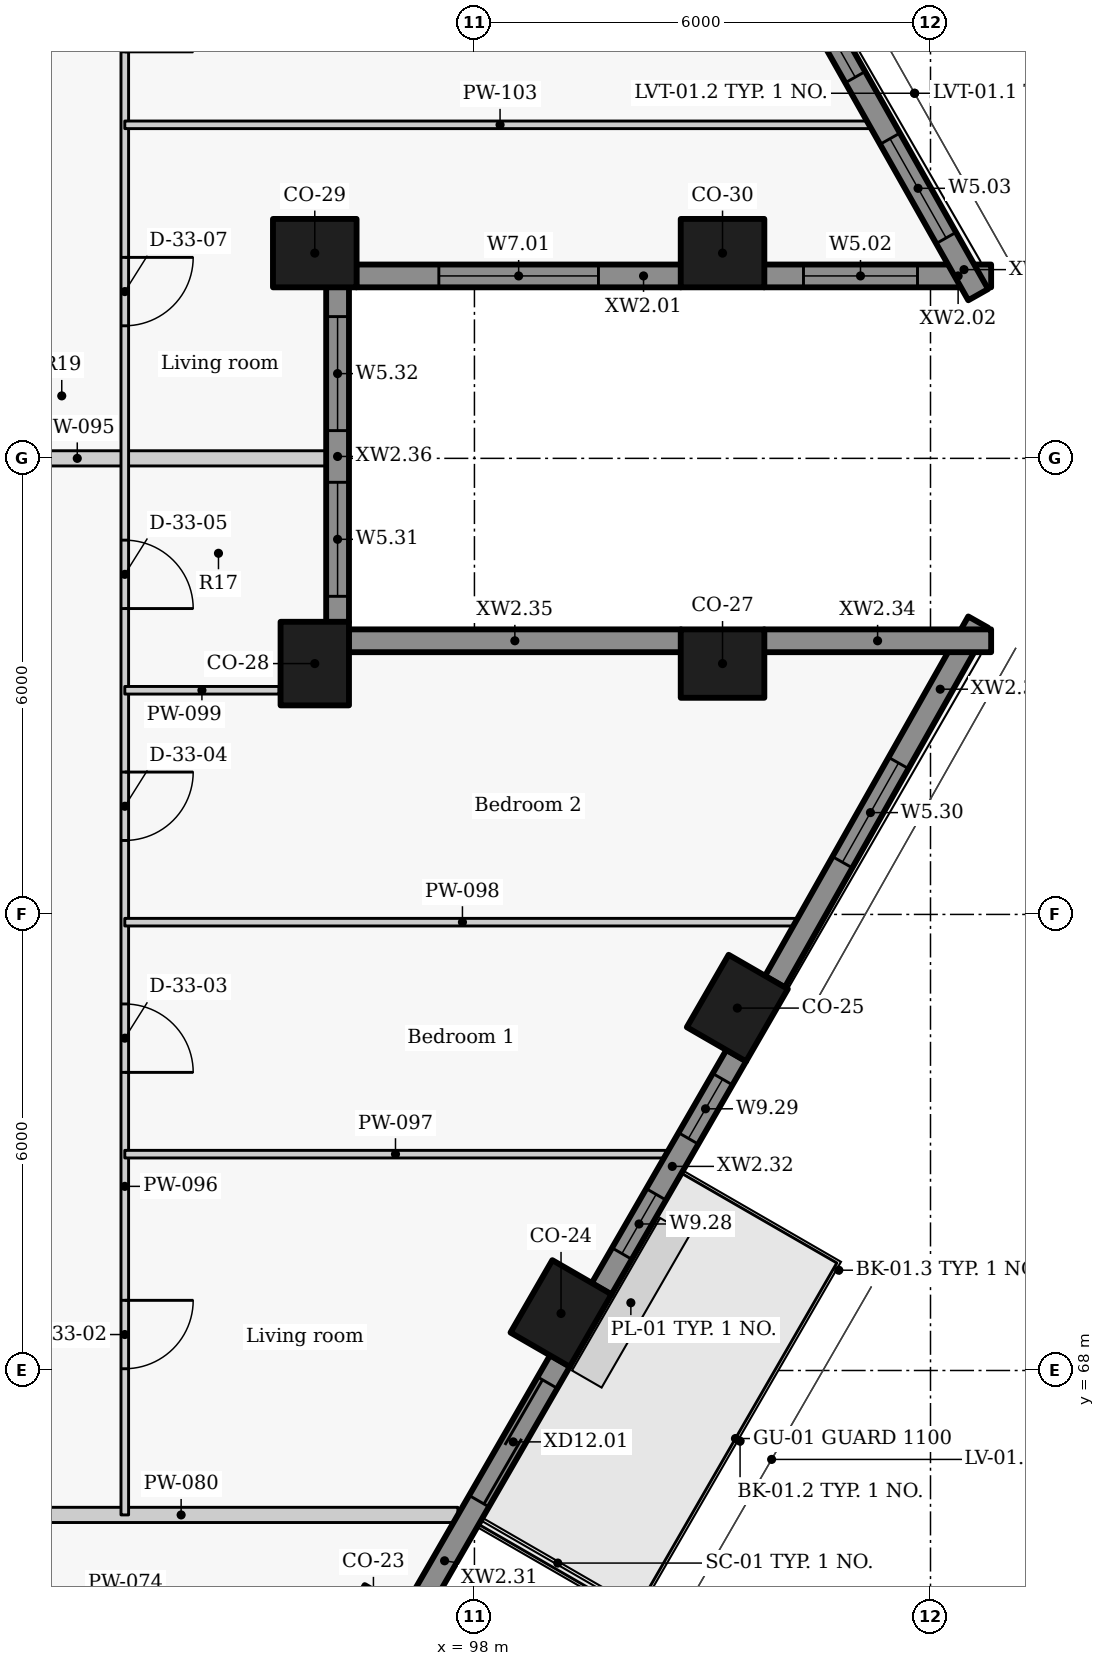
"""IFC4 building model, lengths in metres.
Left out: names, types, materials, properties, quantities, classifications, styles, units other than length and angle.
Written with IfcOpenShell. Run it as: python <this file> out.ifc"""

import sys

from ifc_helpers import new_model, si_unit, direction, frame, frame_2d, origin, origin_2d, place, context, subcontext, project, spatial, rectangle, extrude, element, fill, save


model = new_model("IFC4")
c1 = context("Model", 3, precision=1e-05, world=origin(), true_north=direction((0.0, 1.0)))
c2 = subcontext(c1, "Body", "Model", "MODEL_VIEW")
j1 = project(units=[si_unit("LENGTHUNIT", "METRE"), si_unit("PLANEANGLEUNIT", "RADIAN")], contexts=[c1])
p1 = place(None, origin())
s1 = spatial("IfcSite", under=j1, at=p1, CompositionType="ELEMENT")
p2 = place(p1, origin())
s2 = spatial("IfcBuilding", under=s1, at=p2, CompositionType="ELEMENT")
p3 = place(p2, frame((0.0, 0.0, 229.5)))
s3 = spatial("IfcBuildingStorey", under=s2, at=p3, CompositionType="ELEMENT", Elevation=229.5)
for number, where, z_axis, x_axis in (
    (1, (96.671, 64.475, 0.0), (0.0, 0.0, 1.0), (0.5, 0.866, 0.0)),
    (2, (99.139, 68.75, 0.0), (0.0, 0.0, 1.0), (0.5, 0.866, 0.0)),
    (3, (101.459, 72.768, 0.0), (0.0, 0.0, 1.0), (0.5, 0.866, 0.0)),
    (4, (101.264, 77.3, 0.0), (0.0, 0.0, 1.0), (-1.0, 0.0, 0.0)),
    (5, (95.899, 77.3, 0.0), (0.0, 0.0, 1.0), (0.0, 1.0, 0.0)),
    (6, (95.899, 82.7, 0.0), (0.0, 0.0, 1.0), (1.0, 0.0, 0.0)),
    (7, (101.264, 82.7, 0.0), (0.0, 0.0, 1.0), (1.0, 0.0, 0.0)),
):
    element("IfcColumn", number, at=place(p3, frame(where, z_axis=z_axis, x_axis=x_axis)), inside=s3, PredefinedType="COLUMN", context=c2, shape_type="SweptSolid", body=[
        extrude(rectangle(XDim=1.1, YDim=0.9, at=origin_2d()), origin(), (0.0, 0.0, 1.0), 3.3),
    ])
p4 = place(p3, frame((96.446, 82.4, 0.0), z_axis=(0.0, 0.0, 1.0), x_axis=(1.0, 0.0, 0.0)))
e8 = element("IfcWall", 8, at=p4, inside=s3, PredefinedType="SOLIDWALL", context=c2, shape_type="SweptSolid", body=[
    extrude(rectangle(XDim=4.272, YDim=0.3, at=frame_2d((2.136, 0.0))), origin(), (0.0, 0.0, 1.0), 2.425),
])
p5 = place(p4, frame((1.086, 0.0, 0.9)))
e9 = element("IfcOpeningElement", 9, at=p5, cuts=e8, PredefinedType="OPENING", context=c2, shape_type="SweptSolid", body=[
    extrude(rectangle(XDim=2.1, YDim=1.1, at=frame_2d((1.05, 0.55))), frame((0.0, 0.16, 0.0), z_axis=(0.0, -1.0, 0.0), x_axis=(1.0, 0.0, 0.0)), (0.0, 0.0, 1.0), 0.32),
])
p6 = place(p3, frame((101.81, 82.4, 0.0), z_axis=(0.0, 0.0, 1.0), x_axis=(1.0, 0.0, 0.0)))
e10 = element("IfcWall", 10, at=p6, inside=s3, PredefinedType="SOLIDWALL", context=c2, shape_type="SweptSolid", body=[
    extrude(rectangle(XDim=2.988, YDim=0.3, at=frame_2d((1.494, 0.0))), origin(), (0.0, 0.0, 1.0), 2.425),
])
p7 = place(p6, frame((0.519, 0.0, 0.9)))
e11 = element("IfcOpeningElement", 11, at=p7, cuts=e10, PredefinedType="OPENING", context=c2, shape_type="SweptSolid", body=[
    extrude(rectangle(XDim=1.5, YDim=1.1, at=frame_2d((0.75, 0.55))), frame((0.0, 0.16, 0.0), z_axis=(0.0, -1.0, 0.0), x_axis=(1.0, 0.0, 0.0)), (0.0, 0.0, 1.0), 0.32),
])
p8 = place(p3, frame((104.627, 82.154, 0.0), z_axis=(0.0, 0.0, 1.0), x_axis=(-0.492080931903, 0.870549456641, 0.0)))
e12 = element("IfcWall", 12, at=p8, inside=s3, PredefinedType="SOLIDWALL", context=c2, shape_type="SweptSolid", body=[
    extrude(rectangle(XDim=5.437, YDim=0.3, at=frame_2d((2.718, 0.0))), origin(), (0.0, 0.0, 1.0), 2.425),
])
p9 = place(p8, frame((0.857, 0.0, 0.9)))
e13 = element("IfcOpeningElement", 13, at=p9, cuts=e12, PredefinedType="OPENING", context=c2, shape_type="SweptSolid", body=[
    extrude(rectangle(XDim=1.5, YDim=1.1, at=frame_2d((0.75, 0.55))), frame((0.0, 0.16, 0.0), z_axis=(0.0, -1.0, 0.0), x_axis=(1.0, 0.0, 0.0)), (0.0, 0.0, 1.0), 0.32),
])
p10 = place(p8, frame((3.287, 0.0, 0.9)))
e14 = element("IfcOpeningElement", 14, at=p10, cuts=e12, PredefinedType="OPENING", context=c2, shape_type="SweptSolid", body=[
    extrude(rectangle(XDim=1.5, YDim=1.1, at=frame_2d((0.75, 0.55))), frame((0.0, 0.16, 0.0), z_axis=(0.0, -1.0, 0.0), x_axis=(1.0, 0.0, 0.0)), (0.0, 0.0, 1.0), 0.32),
])
p11 = place(p3, frame((97.204, 64.798, 0.0), z_axis=(0.0, 0.0, 1.0), x_axis=(0.499984490703, 0.866034357896, 0.0)))
e15 = element("IfcWall", 15, at=p11, inside=s3, PredefinedType="SOLIDWALL", context=c2, shape_type="SweptSolid", body=[
    extrude(rectangle(XDim=3.844, YDim=0.3, at=frame_2d((1.922, 0.0))), origin(), (0.0, 0.0, 1.0), 2.425),
])
p12 = place(p11, frame((1.713, 0.0, 0.0)))
e16 = element("IfcOpeningElement", 16, at=p12, cuts=e15, PredefinedType="OPENING", context=c2, shape_type="SweptSolid", body=[
    extrude(rectangle(XDim=1.8, YDim=2.0, at=frame_2d((0.9, 1.0))), frame((0.0, 0.16, 0.0), z_axis=(0.0, -1.0, 0.0), x_axis=(1.0, 0.0, 0.0)), (0.0, 0.0, 1.0), 0.32),
])
p13 = place(p3, frame((99.672, 69.073, 0.0), z_axis=(0.0, 0.0, 1.0), x_axis=(0.500010404316, 0.866019396766, 0.0)))
e17 = element("IfcWall", 17, at=p13, inside=s3, PredefinedType="SOLIDWALL", context=c2, shape_type="SweptSolid", body=[
    extrude(rectangle(XDim=3.547, YDim=0.3, at=frame_2d((1.774, 0.0))), origin(), (0.0, 0.0, 1.0), 2.425),
])
p14 = place(p13, frame((0.537, 0.0, 0.9)))
e18 = element("IfcOpeningElement", 18, at=p14, cuts=e17, PredefinedType="OPENING", context=c2, shape_type="SweptSolid", body=[
    extrude(rectangle(XDim=0.9, YDim=1.1, at=frame_2d((0.45, 0.55))), frame((0.0, 0.16, 0.0), z_axis=(0.0, -1.0, 0.0), x_axis=(1.0, 0.0, 0.0)), (0.0, 0.0, 1.0), 0.32),
])
p15 = place(p13, frame((2.286, 0.0, 0.9)))
e19 = element("IfcOpeningElement", 19, at=p15, cuts=e17, PredefinedType="OPENING", context=c2, shape_type="SweptSolid", body=[
    extrude(rectangle(XDim=0.9, YDim=1.1, at=frame_2d((0.45, 0.55))), frame((0.0, 0.16, 0.0), z_axis=(0.0, -1.0, 0.0), x_axis=(1.0, 0.0, 0.0)), (0.0, 0.0, 1.0), 0.32),
])
p16 = place(p3, frame((101.952, 73.114, 0.0), z_axis=(0.0, 0.0, 1.0), x_axis=(0.492080931903, 0.870549456641, 0.0)))
e20 = element("IfcWall", 20, at=p16, inside=s3, PredefinedType="SOLIDWALL", context=c2, shape_type="SweptSolid", body=[
    extrude(rectangle(XDim=5.437, YDim=0.3, at=frame_2d((2.718, 0.0))), origin(), (0.0, 0.0, 1.0), 2.425),
])
p17 = place(p16, frame((1.807, 0.0, 0.9)))
e21 = element("IfcOpeningElement", 21, at=p17, cuts=e20, PredefinedType="OPENING", context=c2, shape_type="SweptSolid", body=[
    extrude(rectangle(XDim=1.5, YDim=1.1, at=frame_2d((0.75, 0.55))), frame((0.0, 0.16, 0.0), z_axis=(0.0, -1.0, 0.0), x_axis=(1.0, 0.0, 0.0)), (0.0, 0.0, 1.0), 0.32),
])
p18 = place(p3, frame((104.798, 77.6, 0.0), z_axis=(0.0, 0.0, 1.0), x_axis=(-1.0, 0.0, 0.0)))
e22 = element("IfcWall", 22, at=p18, inside=s3, PredefinedType="SOLIDWALL", context=c2, shape_type="SweptSolid", body=[
    extrude(rectangle(XDim=2.988, YDim=0.3, at=frame_2d((1.494, 0.0))), origin(), (0.0, 0.0, 1.0), 2.425),
])
p19 = place(p3, frame((100.718, 77.6, 0.0), z_axis=(0.0, 0.0, 1.0), x_axis=(-1.0, 0.0, 0.0)))
e23 = element("IfcWall", 23, at=p19, inside=s3, PredefinedType="SOLIDWALL", context=c2, shape_type="SweptSolid", body=[
    extrude(rectangle(XDim=4.373, YDim=0.3, at=frame_2d((2.186, 0.0))), origin(), (0.0, 0.0, 1.0), 2.425),
])
p20 = place(p3, frame((96.199, 77.846, 0.0), z_axis=(0.0, 0.0, 1.0), x_axis=(0.0, 1.0, 0.0)))
e24 = element("IfcWall", 24, at=p20, inside=s3, PredefinedType="SOLIDWALL", context=c2, shape_type="SweptSolid", body=[
    extrude(rectangle(XDim=4.408, YDim=0.3, at=frame_2d((2.204, 0.0))), origin(), (0.0, 0.0, 1.0), 2.425),
])
p21 = place(p20, frame((0.339, 0.0, 0.9)))
e25 = element("IfcOpeningElement", 25, at=p21, cuts=e24, PredefinedType="OPENING", context=c2, shape_type="SweptSolid", body=[
    extrude(rectangle(XDim=1.5, YDim=1.1, at=frame_2d((0.75, 0.55))), frame((0.0, 0.16, 0.0), z_axis=(0.0, -1.0, 0.0), x_axis=(1.0, 0.0, 0.0)), (0.0, 0.0, 1.0), 0.32),
])
p22 = place(p20, frame((2.519, 0.0, 0.9)))
e26 = element("IfcOpeningElement", 26, at=p22, cuts=e24, PredefinedType="OPENING", context=c2, shape_type="SweptSolid", body=[
    extrude(rectangle(XDim=1.5, YDim=1.1, at=frame_2d((0.75, 0.55))), frame((0.0, 0.16, 0.0), z_axis=(0.0, -1.0, 0.0), x_axis=(1.0, 0.0, 0.0)), (0.0, 0.0, 1.0), 0.32),
])
p23 = place(p3, frame((90.5, 66.1, 0.0), z_axis=(0.0, 0.0, 1.0), x_axis=(1.0, 0.0, 0.0)))
e27 = element("IfcWall", 27, at=p23, inside=s3, PredefinedType="PARTITIONING", context=c2, shape_type="SweptSolid", body=[
    extrude(rectangle(XDim=7.282, YDim=0.2, at=frame_2d((3.641, 0.0))), origin(), (0.0, 0.0, 1.0), 2.405),
])
p24 = place(p3, frame((89.5, 80.0, 0.0), z_axis=(0.0, 0.0, 1.0), x_axis=(1.0, 0.0, 0.0)))
e28 = element("IfcWall", 28, at=p24, inside=s3, PredefinedType="PARTITIONING", context=c2, shape_type="SweptSolid", body=[
    extrude(rectangle(XDim=6.55, YDim=0.2, at=frame_2d((3.275, 0.0))), origin(), (0.0, 0.0, 1.0), 2.405),
])
p25 = place(p3, frame((93.4, 92.85, 0.0), z_axis=(0.0, 0.0, 1.0), x_axis=(0.0, -1.0, 0.0)))
e29 = element("IfcWall", 29, at=p25, inside=s3, PredefinedType="PARTITIONING", context=c2, shape_type="SweptSolid", body=[
    extrude(rectangle(XDim=26.75, YDim=0.1, at=frame_2d((13.375, 0.0))), origin(), (0.0, 0.0, 1.0), 3.025),
])
p26 = place(p25, frame((23.927, 0.0, 0.0)))
e30 = element("IfcOpeningElement", 30, at=p26, cuts=e29, PredefinedType="OPENING", context=c2, shape_type="SweptSolid", body=[
    extrude(rectangle(XDim=0.9, YDim=2.1, at=frame_2d((0.45, 1.05))), frame((0.0, 0.06, 0.0), z_axis=(0.0, -1.0, 0.0), x_axis=(1.0, 0.0, 0.0)), (0.0, 0.0, 1.0), 0.12),
])
p27 = place(p25, frame((20.028, 0.0, 0.0)))
e31 = element("IfcOpeningElement", 31, at=p27, cuts=e29, PredefinedType="OPENING", context=c2, shape_type="SweptSolid", body=[
    extrude(rectangle(XDim=0.9, YDim=2.1, at=frame_2d((0.45, 1.05))), frame((0.0, 0.06, 0.0), z_axis=(0.0, -1.0, 0.0), x_axis=(1.0, 0.0, 0.0)), (0.0, 0.0, 1.0), 0.12),
])
p28 = place(p25, frame((16.977, 0.0, 0.0)))
e32 = element("IfcOpeningElement", 32, at=p28, cuts=e29, PredefinedType="OPENING", context=c2, shape_type="SweptSolid", body=[
    extrude(rectangle(XDim=0.9, YDim=2.1, at=frame_2d((0.45, 1.05))), frame((0.0, 0.06, 0.0), z_axis=(0.0, -1.0, 0.0), x_axis=(1.0, 0.0, 0.0)), (0.0, 0.0, 1.0), 0.12),
])
p29 = place(p25, frame((13.926, 0.0, 0.0)))
e33 = element("IfcOpeningElement", 33, at=p29, cuts=e29, PredefinedType="OPENING", context=c2, shape_type="SweptSolid", body=[
    extrude(rectangle(XDim=0.9, YDim=2.1, at=frame_2d((0.45, 1.05))), frame((0.0, 0.06, 0.0), z_axis=(0.0, -1.0, 0.0), x_axis=(1.0, 0.0, 0.0)), (0.0, 0.0, 1.0), 0.12),
])
p30 = place(p25, frame((10.206, 0.0, 0.0)))
e34 = element("IfcOpeningElement", 34, at=p30, cuts=e29, PredefinedType="OPENING", context=c2, shape_type="SweptSolid", body=[
    extrude(rectangle(XDim=0.9, YDim=2.1, at=frame_2d((0.45, 1.05))), frame((0.0, 0.06, 0.0), z_axis=(0.0, -1.0, 0.0), x_axis=(1.0, 0.0, 0.0)), (0.0, 0.0, 1.0), 0.12),
])
p31 = place(p25, frame((6.602, 0.0, 0.0)))
e35 = element("IfcOpeningElement", 35, at=p31, cuts=e29, PredefinedType="OPENING", context=c2, shape_type="SweptSolid", body=[
    extrude(rectangle(XDim=0.9, YDim=2.1, at=frame_2d((0.45, 1.05))), frame((0.0, 0.06, 0.0), z_axis=(0.0, -1.0, 0.0), x_axis=(1.0, 0.0, 0.0)), (0.0, 0.0, 1.0), 0.12),
])
p32 = place(p25, frame((3.781, 0.0, 0.0)))
e36 = element("IfcOpeningElement", 36, at=p32, cuts=e29, PredefinedType="OPENING", context=c2, shape_type="SweptSolid", body=[
    extrude(rectangle(XDim=0.9, YDim=2.1, at=frame_2d((0.45, 1.05))), frame((0.0, 0.06, 0.0), z_axis=(0.0, -1.0, 0.0), x_axis=(1.0, 0.0, 0.0)), (0.0, 0.0, 1.0), 0.12),
])
p33 = place(p25, frame((0.96, 0.0, 0.0)))
e37 = element("IfcOpeningElement", 37, at=p33, cuts=e29, PredefinedType="OPENING", context=c2, shape_type="SweptSolid", body=[
    extrude(rectangle(XDim=0.9, YDim=2.1, at=frame_2d((0.45, 1.05))), frame((0.0, 0.06, 0.0), z_axis=(0.0, -1.0, 0.0), x_axis=(1.0, 0.0, 0.0)), (0.0, 0.0, 1.0), 0.12),
])
p34 = place(p3, frame((93.4, 70.846, 0.0), z_axis=(0.0, 0.0, 1.0), x_axis=(1.0, 0.0, 0.0)))
e38 = element("IfcWall", 38, at=p34, inside=s3, PredefinedType="PARTITIONING", context=c2, shape_type="SweptSolid", body=[
    extrude(rectangle(XDim=7.123, YDim=0.1, at=frame_2d((3.562, 0.0))), origin(), (0.0, 0.0, 1.0), 2.405),
])
p35 = place(p3, frame((93.4, 73.898, 0.0), z_axis=(0.0, 0.0, 1.0), x_axis=(1.0, 0.0, 0.0)))
e39 = element("IfcWall", 39, at=p35, inside=s3, PredefinedType="PARTITIONING", context=c2, shape_type="SweptSolid", body=[
    extrude(rectangle(XDim=8.885, YDim=0.1, at=frame_2d((4.442, 0.0))), origin(), (0.0, 0.0, 1.0), 2.405),
])
p36 = place(p3, frame((93.4, 76.949, 0.0), z_axis=(0.0, 0.0, 1.0), x_axis=(1.0, 0.0, 0.0)))
e40 = element("IfcWall", 40, at=p36, inside=s3, PredefinedType="PARTITIONING", context=c2, shape_type="SweptSolid", body=[
    extrude(rectangle(XDim=2.03, YDim=0.1, at=frame_2d((1.015, 0.0))), origin(), (0.0, 0.0, 1.0), 3.025),
])
p37 = place(p3, frame((93.4, 84.388, 0.0), z_axis=(0.0, 0.0, 1.0), x_axis=(1.0, 0.0, 0.0)))
e41 = element("IfcWall", 41, at=p37, inside=s3, PredefinedType="PARTITIONING", context=c2, shape_type="SweptSolid", body=[
    extrude(rectangle(XDim=9.875, YDim=0.1, at=frame_2d((4.937, 0.0))), origin(), (0.0, 0.0, 1.0), 2.405),
])
p38 = place(p5, origin())
e42 = element("IfcWindow", 42, at=p38, inside=s3, PartitioningType="SINGLE_PANEL", PredefinedType="WINDOW", context=c2, shape_type="SweptSolid", body=[
    extrude(rectangle(XDim=2.1, YDim=1.1, at=frame_2d((1.05, 0.55))), frame((0.0, 0.03, 0.0), z_axis=(0.0, -1.0, 0.0), x_axis=(1.0, 0.0, 0.0)), (0.0, 0.0, 1.0), 0.06),
])
fill(e9, e42)
p39 = place(p7, origin())
e43 = element("IfcWindow", 43, at=p39, inside=s3, PartitioningType="SINGLE_PANEL", PredefinedType="WINDOW", context=c2, shape_type="SweptSolid", body=[
    extrude(rectangle(XDim=1.5, YDim=1.1, at=frame_2d((0.75, 0.55))), frame((0.0, 0.03, 0.0), z_axis=(0.0, -1.0, 0.0), x_axis=(1.0, 0.0, 0.0)), (0.0, 0.0, 1.0), 0.06),
])
fill(e11, e43)
p40 = place(p9, origin())
e44 = element("IfcWindow", 44, at=p40, inside=s3, PartitioningType="SINGLE_PANEL", PredefinedType="WINDOW", context=c2, shape_type="SweptSolid", body=[
    extrude(rectangle(XDim=1.5, YDim=1.1, at=frame_2d((0.75, 0.55))), frame((0.0, 0.03, 0.0), z_axis=(0.0, -1.0, 0.0), x_axis=(1.0, 0.0, 0.0)), (0.0, 0.0, 1.0), 0.06),
])
fill(e13, e44)
p41 = place(p10, origin())
e45 = element("IfcWindow", 45, at=p41, inside=s3, PartitioningType="SINGLE_PANEL", PredefinedType="WINDOW", context=c2, shape_type="SweptSolid", body=[
    extrude(rectangle(XDim=1.5, YDim=1.1, at=frame_2d((0.75, 0.55))), frame((0.0, 0.03, 0.0), z_axis=(0.0, -1.0, 0.0), x_axis=(1.0, 0.0, 0.0)), (0.0, 0.0, 1.0), 0.06),
])
fill(e14, e45)
p42 = place(p12, origin())
e46 = element("IfcDoor", 46, at=p42, inside=s3, OperationType="SLIDING_TO_LEFT", PredefinedType="DOOR", context=c2, shape_type="SweptSolid", body=[
    extrude(rectangle(XDim=1.8, YDim=2.0, at=frame_2d((0.9, 1.0))), frame((0.0, 0.025, 0.0), z_axis=(0.0, -1.0, 0.0), x_axis=(1.0, 0.0, 0.0)), (0.0, 0.0, 1.0), 0.05),
])
fill(e16, e46)
p43 = place(p14, origin())
e47 = element("IfcWindow", 47, at=p43, inside=s3, PartitioningType="SINGLE_PANEL", PredefinedType="WINDOW", context=c2, shape_type="SweptSolid", body=[
    extrude(rectangle(XDim=0.9, YDim=1.1, at=frame_2d((0.45, 0.55))), frame((0.0, 0.03, 0.0), z_axis=(0.0, -1.0, 0.0), x_axis=(1.0, 0.0, 0.0)), (0.0, 0.0, 1.0), 0.06),
])
fill(e18, e47)
p44 = place(p15, origin())
e48 = element("IfcWindow", 48, at=p44, inside=s3, PartitioningType="SINGLE_PANEL", PredefinedType="WINDOW", context=c2, shape_type="SweptSolid", body=[
    extrude(rectangle(XDim=0.9, YDim=1.1, at=frame_2d((0.45, 0.55))), frame((0.0, 0.03, 0.0), z_axis=(0.0, -1.0, 0.0), x_axis=(1.0, 0.0, 0.0)), (0.0, 0.0, 1.0), 0.06),
])
fill(e19, e48)
p45 = place(p17, origin())
e49 = element("IfcWindow", 49, at=p45, inside=s3, PartitioningType="SINGLE_PANEL", PredefinedType="WINDOW", context=c2, shape_type="SweptSolid", body=[
    extrude(rectangle(XDim=1.5, YDim=1.1, at=frame_2d((0.75, 0.55))), frame((0.0, 0.03, 0.0), z_axis=(0.0, -1.0, 0.0), x_axis=(1.0, 0.0, 0.0)), (0.0, 0.0, 1.0), 0.06),
])
fill(e21, e49)
p46 = place(p21, origin())
e50 = element("IfcWindow", 50, at=p46, inside=s3, PartitioningType="SINGLE_PANEL", PredefinedType="WINDOW", context=c2, shape_type="SweptSolid", body=[
    extrude(rectangle(XDim=1.5, YDim=1.1, at=frame_2d((0.75, 0.55))), frame((0.0, 0.03, 0.0), z_axis=(0.0, -1.0, 0.0), x_axis=(1.0, 0.0, 0.0)), (0.0, 0.0, 1.0), 0.06),
])
fill(e25, e50)
p47 = place(p22, origin())
e51 = element("IfcWindow", 51, at=p47, inside=s3, PartitioningType="SINGLE_PANEL", PredefinedType="WINDOW", context=c2, shape_type="SweptSolid", body=[
    extrude(rectangle(XDim=1.5, YDim=1.1, at=frame_2d((0.75, 0.55))), frame((0.0, 0.03, 0.0), z_axis=(0.0, -1.0, 0.0), x_axis=(1.0, 0.0, 0.0)), (0.0, 0.0, 1.0), 0.06),
])
fill(e26, e51)
p48 = place(p26, origin())
e52 = element("IfcDoor", 52, at=p48, inside=s3, OperationType="SINGLE_SWING_LEFT", PredefinedType="DOOR", context=c2, shape_type="SweptSolid", body=[
    extrude(rectangle(XDim=0.9, YDim=2.1, at=frame_2d((0.45, 1.05))), frame((0.0, 0.025, 0.0), z_axis=(0.0, -1.0, 0.0), x_axis=(1.0, 0.0, 0.0)), (0.0, 0.0, 1.0), 0.05),
])
fill(e30, e52)
p49 = place(p27, origin())
e53 = element("IfcDoor", 53, at=p49, inside=s3, OperationType="SINGLE_SWING_RIGHT", PredefinedType="DOOR", context=c2, shape_type="SweptSolid", body=[
    extrude(rectangle(XDim=0.9, YDim=2.1, at=frame_2d((0.45, 1.05))), frame((0.0, 0.025, 0.0), z_axis=(0.0, -1.0, 0.0), x_axis=(1.0, 0.0, 0.0)), (0.0, 0.0, 1.0), 0.05),
])
fill(e31, e53)
p50 = place(p28, origin())
e54 = element("IfcDoor", 54, at=p50, inside=s3, OperationType="SINGLE_SWING_LEFT", PredefinedType="DOOR", context=c2, shape_type="SweptSolid", body=[
    extrude(rectangle(XDim=0.9, YDim=2.1, at=frame_2d((0.45, 1.05))), frame((0.0, 0.025, 0.0), z_axis=(0.0, -1.0, 0.0), x_axis=(1.0, 0.0, 0.0)), (0.0, 0.0, 1.0), 0.05),
])
fill(e32, e54)
p51 = place(p29, origin())
e55 = element("IfcDoor", 55, at=p51, inside=s3, OperationType="SINGLE_SWING_RIGHT", PredefinedType="DOOR", context=c2, shape_type="SweptSolid", body=[
    extrude(rectangle(XDim=0.9, YDim=2.1, at=frame_2d((0.45, 1.05))), frame((0.0, 0.025, 0.0), z_axis=(0.0, -1.0, 0.0), x_axis=(1.0, 0.0, 0.0)), (0.0, 0.0, 1.0), 0.05),
])
fill(e33, e55)
p52 = place(p30, origin())
e56 = element("IfcDoor", 56, at=p52, inside=s3, OperationType="SINGLE_SWING_LEFT", PredefinedType="DOOR", context=c2, shape_type="SweptSolid", body=[
    extrude(rectangle(XDim=0.9, YDim=2.1, at=frame_2d((0.45, 1.05))), frame((0.0, 0.025, 0.0), z_axis=(0.0, -1.0, 0.0), x_axis=(1.0, 0.0, 0.0)), (0.0, 0.0, 1.0), 0.05),
])
fill(e34, e56)
save(model, sys.argv[1])
